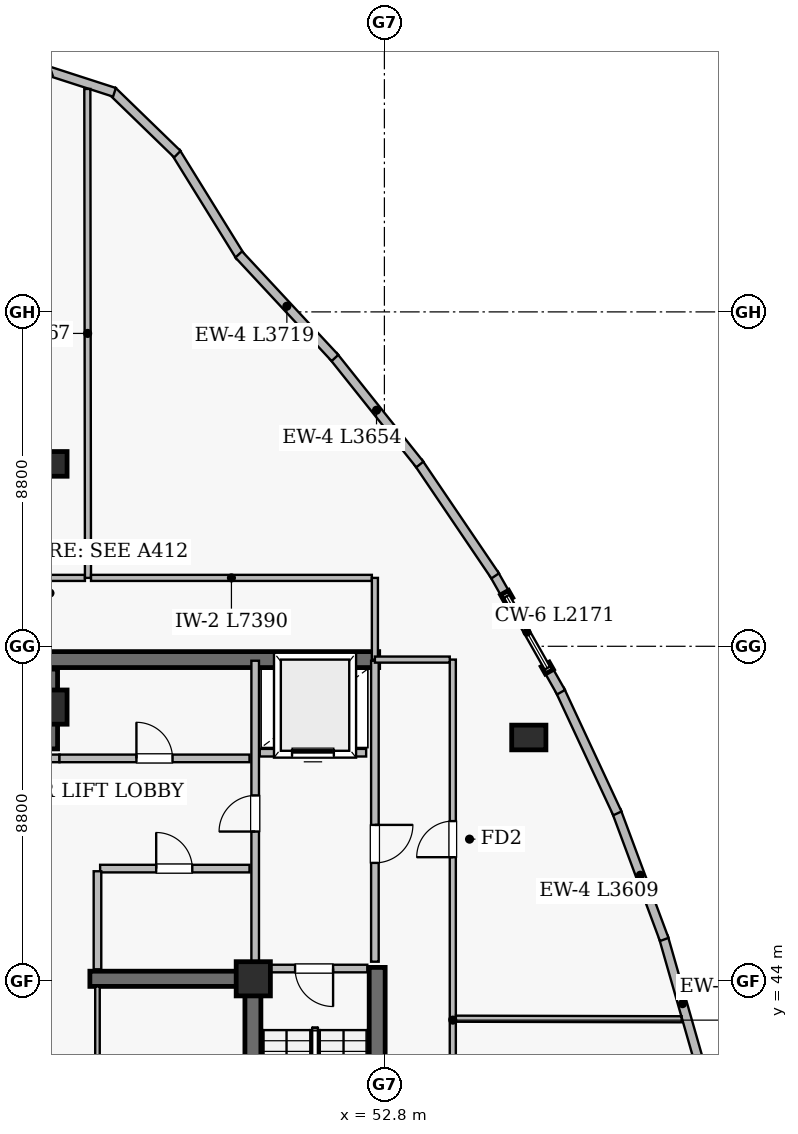
"""IFC4 building model, lengths in metres.
Left out: names, types, materials, properties, quantities, classifications, styles, units other than length and angle.
Written with IfcOpenShell. Run it as: python <this file> out.ifc"""

import sys

from ifc_helpers import new_model, si_unit, direction, frame, frame_2d, origin, origin_2d, place, context, subcontext, project, spatial, rectangle, extrude, element, fill, save


model = new_model("IFC4")
c1 = context("Model", 3, precision=1e-05, world=origin(), true_north=direction((0.0, 1.0)))
c2 = subcontext(c1, "Body", "Model", "MODEL_VIEW")
j1 = project(units=[si_unit("LENGTHUNIT", "METRE"), si_unit("PLANEANGLEUNIT", "RADIAN")], contexts=[c1])
p1 = place(None, origin())
s1 = spatial("IfcSite", under=j1, at=p1, CompositionType="ELEMENT")
p2 = place(p1, origin())
s2 = spatial("IfcBuilding", under=s1, at=p2, CompositionType="ELEMENT")
p3 = place(p2, frame((0.0, 0.0, 306.8)))
s3 = spatial("IfcBuildingStorey", under=s2, at=p3, CompositionType="ELEMENT", Elevation=306.8)
p4 = place(p3, frame((35.35, 52.45, 0.0), z_axis=(0.0, 0.0, 1.0), x_axis=(1.0, 0.0, 0.0)))
e1 = element("IfcWall", 1, at=p4, inside=s3, PredefinedType="SHEAR", context=c2, shape_type="SweptSolid", body=[
    extrude(rectangle(XDim=17.3, YDim=0.42, at=frame_2d((8.65, 0.0))), origin(), (0.0, 0.0, 1.0), 5.74),
])
p5 = place(p3, frame((52.61, 35.18, 0.0), z_axis=(0.0, 0.0, 1.0), x_axis=(0.0, 1.0, 0.0)))
e2 = element("IfcWall", 2, at=p5, inside=s3, PredefinedType="SHEAR", context=c2, shape_type="SweptSolid", body=[
    extrude(rectangle(XDim=9.17, YDim=0.42, at=frame_2d((4.585, 0.0))), origin(), (0.0, 0.0, 1.0), 5.74),
])
p6 = place(p3, frame((49.34, 35.4, 0.0), z_axis=(0.0, 0.0, 1.0), x_axis=(0.0, 1.0, 0.0)))
e3 = element("IfcWall", 3, at=p6, inside=s3, PredefinedType="SHEAR", context=c2, shape_type="SweptSolid", body=[
    extrude(rectangle(XDim=8.95, YDim=0.42, at=frame_2d((4.475, 0.0))), origin(), (0.0, 0.0, 1.0), 5.74),
])
p7 = place(p3, frame((44.0, 50.1, 0.0), z_axis=(0.0, 0.0, 1.0), x_axis=(0.0, 1.0, 0.0)))
e4 = element("IfcWall", 4, at=p7, inside=s3, PredefinedType="SHEAR", context=c2, shape_type="SweptSolid", body=[
    extrude(rectangle(XDim=2.1, YDim=0.4, at=frame_2d((1.05, 0.0))), origin(), (0.0, 0.0, 1.0), 5.74),
])
p8 = place(p3, frame((45.05, 44.05, 0.0), z_axis=(0.0, 0.0, 1.0), x_axis=(1.0, 0.0, 0.0)))
e5 = element("IfcWall", 5, at=p8, inside=s3, PredefinedType="SHEAR", context=c2, shape_type="SweptSolid", body=[
    extrude(rectangle(XDim=4.2, YDim=0.4, at=frame_2d((2.1, 0.0))), origin(), (0.0, 0.0, 1.0), 5.74),
])
for number, where, z_axis, x_axis in (
    (6, (49.35, 44.05, 0.0), (0.0, 0.0, 1.0), (1.0, 0.0, 0.0)),
    (7, (44.0, 51.2, 0.0), (0.0, 0.0, 1.0), (1.0, 0.0, 0.0)),
):
    element("IfcColumn", number, at=place(p3, frame(where, z_axis=z_axis, x_axis=x_axis)), inside=s3, PredefinedType="COLUMN", context=c2, shape_type="SweptSolid", body=[
        extrude(rectangle(XDim=0.9, YDim=0.9, at=origin_2d()), origin(), (0.0, 0.0, 1.0), 6.0),
    ])
for number, where, z_axis, x_axis in (
    (8, (44.0, 57.6, 0.0), (0.0, 0.0, 1.0), (1.0, 0.0, 0.0)),
    (9, (56.6, 50.4, 0.0), (0.0, 0.0, 1.0), (1.0, 0.0, 0.0)),
):
    element("IfcColumn", number, at=place(p3, frame(where, z_axis=z_axis, x_axis=x_axis)), inside=s3, PredefinedType="COLUMN", context=c2, shape_type="SweptSolid", body=[
        extrude(rectangle(XDim=0.9, YDim=0.65, at=origin_2d()), origin(), (0.0, 0.0, 1.0), 6.0),
    ])
p9 = place(p3, frame((49.01, 63.056, 0.0), z_axis=(0.0, 0.0, 1.0), x_axis=(-0.526110187608, 0.850416410058, 0.0)))
e10 = element("IfcWall", 10, at=p9, inside=s3, PredefinedType="SOLIDWALL", context=c2, shape_type="SweptSolid", body=[
    extrude(rectangle(XDim=3.233, YDim=0.24, at=frame_2d((1.616, 0.0))), origin(), (0.0, 0.0, 1.0), 5.74),
])
p10 = place(p3, frame((47.352, 65.751, 0.0), z_axis=(0.0, 0.0, 1.0), x_axis=(-0.717711443968, 0.69634063733, 0.0)))
e11 = element("IfcWall", 11, at=p10, inside=s3, PredefinedType="SOLIDWALL", context=c2, shape_type="SweptSolid", body=[
    extrude(rectangle(XDim=2.388, YDim=0.24, at=frame_2d((1.194, 0.0))), origin(), (0.0, 0.0, 1.0), 5.74),
])
for number, where, z_axis, x_axis in (
    (12, (45.697, 67.378, 0.0), (0.0, 0.0, 1.0), (-0.952, 0.308, 0.0)),
    (13, (44.033, 67.938, 0.0), (0.0, 0.0, 1.0), (-0.952, -0.308, 0.0)),
):
    element("IfcWall", number, at=place(p3, frame(where, z_axis=z_axis, x_axis=x_axis)), inside=s3, PredefinedType="SOLIDWALL", context=c2, shape_type="SweptSolid", body=[
        extrude(rectangle(XDim=1.818, YDim=0.24, at=frame_2d((0.909, 0.0))), origin(), (0.0, 0.0, 1.0), 5.74),
    ])
p11 = place(p3, frame((61.146, 41.639, 0.0), z_axis=(0.0, 0.0, 1.0), x_axis=(-0.274897629025, 0.961473501224, 0.0)))
e14 = element("IfcWall", 14, at=p11, inside=s3, PredefinedType="SOLIDWALL", context=c2, shape_type="SweptSolid", body=[
    extrude(rectangle(XDim=3.654, YDim=0.24, at=frame_2d((1.827, 0.0))), origin(), (0.0, 0.0, 1.0), 5.74),
])
p12 = place(p3, frame((60.163, 45.085, 0.0), z_axis=(0.0, 0.0, 1.0), x_axis=(-0.349054279873, 0.937102507574, 0.0)))
e15 = element("IfcWall", 15, at=p12, inside=s3, PredefinedType="SOLIDWALL", context=c2, shape_type="SweptSolid", body=[
    extrude(rectangle(XDim=3.609, YDim=0.24, at=frame_2d((1.805, 0.0))), origin(), (0.0, 0.0, 1.0), 5.74),
])
p13 = place(p3, frame((58.931, 48.403, 0.0), z_axis=(0.0, 0.0, 1.0), x_axis=(-0.422322757118, 0.906445524464, 0.0)))
e16 = element("IfcWall", 16, at=p13, inside=s3, PredefinedType="SOLIDWALL", context=c2, shape_type="SweptSolid", body=[
    extrude(rectangle(XDim=3.587, YDim=0.24, at=frame_2d((1.793, 0.0))), origin(), (0.0, 0.0, 1.0), 5.74),
])
p14 = place(p3, frame((57.448, 51.592, 0.0), z_axis=(0.0, 0.0, 1.0), x_axis=(-0.493406174407, 0.86979902682, 0.0)))
e17 = element("IfcWall", 17, at=p14, inside=s3, PredefinedType="SOLIDWALL", context=c2, shape_type="SweptSolid", body=[
    extrude(rectangle(XDim=0.751, YDim=0.24, at=frame_2d((0.375, 0.0))), origin(), (0.0, 0.0, 1.0), 5.74),
])
p15 = place(p3, frame((56.026, 54.099, 0.0), z_axis=(0.0, 0.0, 1.0), x_axis=(-0.493300984784, 0.86985868876, 0.0)))
e18 = element("IfcWall", 18, at=p15, inside=s3, PredefinedType="SOLIDWALL", context=c2, shape_type="SweptSolid", body=[
    extrude(rectangle(XDim=0.705, YDim=0.24, at=frame_2d((0.353, 0.0))), origin(), (0.0, 0.0, 1.0), 5.74),
])
p16 = place(p3, frame((55.715, 54.653, 0.0), z_axis=(0.0, 0.0, 1.0), x_axis=(-0.560819727484, 0.827937940467, 0.0)))
e19 = element("IfcWall", 19, at=p16, inside=s3, PredefinedType="SOLIDWALL", context=c2, shape_type="SweptSolid", body=[
    extrude(rectangle(XDim=3.609, YDim=0.24, at=frame_2d((1.805, 0.0))), origin(), (0.0, 0.0, 1.0), 5.74),
])
p17 = place(p3, frame((53.732, 57.584, 0.0), z_axis=(0.0, 0.0, 1.0), x_axis=(-0.623626980574, 0.781722066402, 0.0)))
e20 = element("IfcWall", 20, at=p17, inside=s3, PredefinedType="SOLIDWALL", context=c2, shape_type="SweptSolid", body=[
    extrude(rectangle(XDim=3.654, YDim=0.24, at=frame_2d((1.827, 0.0))), origin(), (0.0, 0.0, 1.0), 5.74),
])
p18 = place(p3, frame((51.5, 60.388, 0.0), z_axis=(0.0, 0.0, 1.0), x_axis=(-0.68087147599, 0.732402917241, 0.0)))
e21 = element("IfcWall", 21, at=p18, inside=s3, PredefinedType="SOLIDWALL", context=c2, shape_type="SweptSolid", body=[
    extrude(rectangle(XDim=3.719, YDim=0.24, at=frame_2d((1.859, 0.0))), origin(), (0.0, 0.0, 1.0), 5.74),
])
p19 = place(p3, frame((44.92, 54.6, 0.0), z_axis=(0.0, 0.0, 1.0), x_axis=(-1.0, 0.0, 0.0)))
e22 = element("IfcWall", 22, at=p19, inside=s3, PredefinedType="SOLIDWALL", context=c2, shape_type="SweptSolid", body=[
    extrude(rectangle(XDim=12.507, YDim=0.16, at=frame_2d((6.253, 0.0))), origin(), (0.0, 0.0, 1.0), 4.828),
])
p20 = place(p19, frame((5.779, 0.0, 0.0)))
e23 = element("IfcOpeningElement", 23, at=p20, cuts=e22, PredefinedType="OPENING", context=c2, shape_type="SweptSolid", body=[
    extrude(rectangle(XDim=0.95, YDim=2.15, at=frame_2d((0.475, 1.075))), frame((0.0, 0.09, 0.0), z_axis=(0.0, -1.0, 0.0), x_axis=(1.0, 0.0, 0.0)), (0.0, 0.0, 1.0), 0.18),
])
p21 = place(p3, frame((54.6, 33.4, 0.0), z_axis=(0.0, 0.0, 1.0), x_axis=(0.0, 1.0, 0.0)))
e24 = element("IfcWall", 24, at=p21, inside=s3, PredefinedType="SOLIDWALL", context=c2, shape_type="SweptSolid", body=[
    extrude(rectangle(XDim=9.6, YDim=0.16, at=frame_2d((4.8, 0.0))), origin(), (0.0, 0.0, 1.0), 4.828),
])
p22 = place(p21, frame((4.325, 0.0, 0.0)))
e25 = element("IfcOpeningElement", 25, at=p22, cuts=e24, PredefinedType="OPENING", context=c2, shape_type="SweptSolid", body=[
    extrude(rectangle(XDim=0.95, YDim=2.15, at=frame_2d((0.475, 1.075))), frame((0.0, 0.09, 0.0), z_axis=(0.0, -1.0, 0.0), x_axis=(1.0, 0.0, 0.0)), (0.0, 0.0, 1.0), 0.18),
])
p23 = place(p3, frame((54.6, 43.0, 0.0), z_axis=(0.0, 0.0, 1.0), x_axis=(0.0, 1.0, 0.0)))
e26 = element("IfcWall", 26, at=p23, inside=s3, PredefinedType="SOLIDWALL", context=c2, shape_type="SweptSolid", body=[
    extrude(rectangle(XDim=9.45, YDim=0.16, at=frame_2d((4.725, 0.0))), origin(), (0.0, 0.0, 1.0), 4.828),
])
p24 = place(p23, frame((4.25, 0.0, 0.0)))
e27 = element("IfcOpeningElement", 27, at=p24, cuts=e26, PredefinedType="OPENING", context=c2, shape_type="SweptSolid", body=[
    extrude(rectangle(XDim=0.95, YDim=2.15, at=frame_2d((0.475, 1.075))), frame((0.0, 0.09, 0.0), z_axis=(0.0, -1.0, 0.0), x_axis=(1.0, 0.0, 0.0)), (0.0, 0.0, 1.0), 0.18),
])
p25 = place(p3, frame((45.25, 35.6, 0.0), z_axis=(0.0, 0.0, 1.0), x_axis=(0.0, 1.0, 0.0)))
e28 = element("IfcWall", 28, at=p25, inside=s3, PredefinedType="PARTITIONING", context=c2, shape_type="SweptSolid", body=[
    extrude(rectangle(XDim=8.25, YDim=0.12, at=frame_2d((4.125, 0.0))), origin(), (0.0, 0.0, 1.0), 5.74),
])
p26 = place(p25, frame((3.625, 0.0, 0.0)))
e29 = element("IfcOpeningElement", 29, at=p26, cuts=e28, PredefinedType="OPENING", context=c2, shape_type="SweptSolid", body=[
    extrude(rectangle(XDim=0.95, YDim=2.1, at=frame_2d((0.475, 1.05))), frame((0.0, 0.07, 0.0), z_axis=(0.0, -1.0, 0.0), x_axis=(1.0, 0.0, 0.0)), (0.0, 0.0, 1.0), 0.14),
])
p27 = place(p3, frame((52.55, 44.5, 0.0), z_axis=(0.0, 0.0, 1.0), x_axis=(0.0, 1.0, 0.0)))
e30 = element("IfcWall", 30, at=p27, inside=s3, PredefinedType="SOLIDWALL", context=c2, shape_type="SweptSolid", body=[
    extrude(rectangle(XDim=7.92, YDim=0.2, at=frame_2d((3.96, 0.0))), origin(), (0.0, 0.0, 1.0), 5.74),
])
p28 = place(p27, frame((2.6, 0.0, 0.0)))
e31 = element("IfcOpeningElement", 31, at=p28, cuts=e30, PredefinedType="OPENING", context=c2, shape_type="SweptSolid", body=[
    extrude(rectangle(XDim=1.0, YDim=2.15, at=frame_2d((0.5, 1.075))), frame((0.0, 0.11, 0.0), z_axis=(0.0, -1.0, 0.0), x_axis=(1.0, 0.0, 0.0)), (0.0, 0.0, 1.0), 0.22),
])
p29 = place(p3, frame((49.4, 44.5, 0.0), z_axis=(0.0, 0.0, 1.0), x_axis=(0.0, 1.0, 0.0)))
e32 = element("IfcWall", 32, at=p29, inside=s3, PredefinedType="SOLIDWALL", context=c2, shape_type="SweptSolid", body=[
    extrude(rectangle(XDim=7.92, YDim=0.2, at=frame_2d((3.96, 0.0))), origin(), (0.0, 0.0, 1.0), 4.828),
])
p30 = place(p29, frame((3.425, 0.0, 0.0)))
e33 = element("IfcOpeningElement", 33, at=p30, cuts=e32, PredefinedType="OPENING", context=c2, shape_type="SweptSolid", body=[
    extrude(rectangle(XDim=0.95, YDim=2.15, at=frame_2d((0.475, 1.075))), frame((0.0, 0.11, 0.0), z_axis=(0.0, -1.0, 0.0), x_axis=(1.0, 0.0, 0.0)), (0.0, 0.0, 1.0), 0.22),
])
p31 = place(p3, frame((38.75, 49.85, 0.0), z_axis=(0.0, 0.0, 1.0), x_axis=(1.0, 0.0, 0.0)))
e34 = element("IfcWall", 34, at=p31, inside=s3, PredefinedType="SOLIDWALL", context=c2, shape_type="SweptSolid", body=[
    extrude(rectangle(XDim=5.5, YDim=0.2, at=frame_2d((2.75, 0.0))), origin(), (0.0, 0.0, 1.0), 5.74),
])
p32 = place(p31, frame((2.025, 0.0, 0.0)))
e35 = element("IfcOpeningElement", 35, at=p32, cuts=e34, PredefinedType="OPENING", context=c2, shape_type="SweptSolid", body=[
    extrude(rectangle(XDim=0.95, YDim=2.15, at=frame_2d((0.475, 1.075))), frame((0.0, 0.11, 0.0), z_axis=(0.0, -1.0, 0.0), x_axis=(1.0, 0.0, 0.0)), (0.0, 0.0, 1.0), 0.22),
])
p33 = place(p3, frame((44.25, 49.85, 0.0), z_axis=(0.0, 0.0, 1.0), x_axis=(1.0, 0.0, 0.0)))
e36 = element("IfcWall", 36, at=p33, inside=s3, PredefinedType="SOLIDWALL", context=c2, shape_type="SweptSolid", body=[
    extrude(rectangle(XDim=5.0, YDim=0.2, at=frame_2d((2.5, 0.0))), origin(), (0.0, 0.0, 1.0), 4.828),
])
p34 = place(p33, frame((2.025, 0.0, 0.0)))
e37 = element("IfcOpeningElement", 37, at=p34, cuts=e36, PredefinedType="OPENING", context=c2, shape_type="SweptSolid", body=[
    extrude(rectangle(XDim=0.95, YDim=2.15, at=frame_2d((0.475, 1.075))), frame((0.0, 0.11, 0.0), z_axis=(0.0, -1.0, 0.0), x_axis=(1.0, 0.0, 0.0)), (0.0, 0.0, 1.0), 0.22),
])
p35 = place(p3, frame((45.32, 46.95, 0.0), z_axis=(0.0, 0.0, 1.0), x_axis=(1.0, 0.0, 0.0)))
e38 = element("IfcWall", 38, at=p35, inside=s3, PredefinedType="SOLIDWALL", context=c2, shape_type="SweptSolid", body=[
    extrude(rectangle(XDim=3.93, YDim=0.2, at=frame_2d((1.965, 0.0))), origin(), (0.0, 0.0, 1.0), 4.828),
])
p36 = place(p35, frame((1.475, 0.0, 0.0)))
e39 = element("IfcOpeningElement", 39, at=p36, cuts=e38, PredefinedType="OPENING", context=c2, shape_type="SweptSolid", body=[
    extrude(rectangle(XDim=0.95, YDim=2.1, at=frame_2d((0.475, 1.05))), frame((0.0, 0.11, 0.0), z_axis=(0.0, -1.0, 0.0), x_axis=(1.0, 0.0, 0.0)), (0.0, 0.0, 1.0), 0.22),
])
p37 = place(p3, frame((49.55, 44.32, 0.0), z_axis=(0.0, 0.0, 1.0), x_axis=(1.0, 0.0, 0.0)))
e40 = element("IfcWall", 40, at=p37, inside=s3, PredefinedType="SOLIDWALL", context=c2, shape_type="SweptSolid", body=[
    extrude(rectangle(XDim=2.8, YDim=0.2, at=frame_2d((1.4, 0.0))), origin(), (0.0, 0.0, 1.0), 4.828),
])
p38 = place(p37, frame((0.9, 0.0, 0.0)))
e41 = element("IfcOpeningElement", 41, at=p38, cuts=e40, PredefinedType="OPENING", context=c2, shape_type="SweptSolid", body=[
    extrude(rectangle(XDim=1.0, YDim=2.15, at=frame_2d((0.5, 1.075))), frame((0.0, 0.11, 0.0), z_axis=(0.0, -1.0, 0.0), x_axis=(1.0, 0.0, 0.0)), (0.0, 0.0, 1.0), 0.22),
])
p39 = place(p3, frame((49.52, 50.0, 0.0), z_axis=(0.0, 0.0, 1.0), x_axis=(1.0, 0.0, 0.0)))
e42 = element("IfcWall", 42, at=p39, inside=s3, PredefinedType="SOLIDWALL", context=c2, shape_type="SweptSolid", body=[
    extrude(rectangle(XDim=2.8, YDim=0.2, at=frame_2d((1.4, 0.0))), origin(), (0.0, 0.0, 1.0), 5.74),
])
p40 = place(p39, frame((0.85, 0.0, 0.0)))
e43 = element("IfcOpeningElement", 43, at=p40, cuts=e42, PredefinedType="OPENING", context=c2, shape_type="SweptSolid", body=[
    extrude(rectangle(XDim=1.1, YDim=2.15, at=frame_2d((0.55, 1.075))), frame((0.0, 0.11, 0.0), z_axis=(0.0, -1.0, 0.0), x_axis=(1.0, 0.0, 0.0)), (0.0, 0.0, 1.0), 0.22),
])
p41 = place(p3, frame((45.0, 54.6, 0.0), z_axis=(0.0, 0.0, 1.0), x_axis=(-0.001328196464, 0.999999117947, 0.0)))
e44 = element("IfcWall", 44, at=p41, inside=s3, PredefinedType="SOLIDWALL", context=c2, shape_type="SweptSolid", body=[
    extrude(rectangle(XDim=12.867, YDim=0.16, at=frame_2d((6.434, 0.0))), origin(), (0.0, 0.0, 1.0), 4.828),
])
p42 = place(p3, frame((52.47, 54.6, 0.0), z_axis=(0.0, 0.0, 1.0), x_axis=(-1.0, 0.0, 0.0)))
e45 = element("IfcWall", 45, at=p42, inside=s3, PredefinedType="SOLIDWALL", context=c2, shape_type="SweptSolid", body=[
    extrude(rectangle(XDim=7.39, YDim=0.16, at=frame_2d((3.695, 0.0))), origin(), (0.0, 0.0, 1.0), 4.828),
])
p43 = place(p3, frame((60.621, 42.985, 0.0), z_axis=(0.0, 0.0, 1.0), x_axis=(-0.999996858298, 0.00250666975, 0.0)))
e46 = element("IfcWall", 46, at=p43, inside=s3, PredefinedType="SOLIDWALL", context=c2, shape_type="SweptSolid", body=[
    extrude(rectangle(XDim=5.941, YDim=0.16, at=frame_2d((2.971, 0.0))), origin(), (0.0, 0.0, 1.0), 4.828),
])
p44 = place(p3, frame((45.25, 44.3, 0.0), z_axis=(0.0, 0.0, 1.0), x_axis=(0.0, 1.0, 0.0)))
e47 = element("IfcWall", 47, at=p44, inside=s3, PredefinedType="SOLIDWALL", context=c2, shape_type="SweptSolid", body=[
    extrude(rectangle(XDim=2.58, YDim=0.2, at=frame_2d((1.29, 0.0))), origin(), (0.0, 0.0, 1.0), 5.74),
])
p45 = place(p3, frame((52.55, 52.45, 0.0), z_axis=(0.0, 0.0, 1.0), x_axis=(0.0, 1.0, 0.0)))
e48 = element("IfcWall", 48, at=p45, inside=s3, PredefinedType="SOLIDWALL", context=c2, shape_type="SweptSolid", body=[
    extrude(rectangle(XDim=2.15, YDim=0.16, at=frame_2d((1.075, 0.0))), origin(), (0.0, 0.0, 1.0), 4.828),
])
p46 = place(p3, frame((54.52, 52.45, 0.0), z_axis=(0.0, 0.0, 1.0), x_axis=(-1.0, 0.0, 0.0)))
e49 = element("IfcWall", 49, at=p46, inside=s3, PredefinedType="SOLIDWALL", context=c2, shape_type="SweptSolid", body=[
    extrude(rectangle(XDim=1.97, YDim=0.16, at=frame_2d((0.985, 0.0))), origin(), (0.0, 0.0, 1.0), 4.828),
])
p47 = place(p38, frame((1.0, 0.0, 0.0), z_axis=(0.0, 0.0, 1.0), x_axis=(-1.0, 0.0, 0.0)))
e50 = element("IfcDoor", 50, at=p47, inside=s3, OperationType="SINGLE_SWING_RIGHT", PredefinedType="DOOR", context=c2, shape_type="SweptSolid", body=[
    extrude(rectangle(XDim=1.0, YDim=2.15, at=frame_2d((0.5, 1.075))), frame((0.0, 0.025, 0.0), z_axis=(0.0, -1.0, 0.0), x_axis=(1.0, 0.0, 0.0)), (0.0, 0.0, 1.0), 0.05),
])
fill(e41, e50)
p48 = place(p28, frame((1.0, 0.0, 0.0), z_axis=(0.0, 0.0, 1.0), x_axis=(-1.0, 0.0, 0.0)))
e51 = element("IfcDoor", 51, at=p48, inside=s3, OperationType="SINGLE_SWING_RIGHT", PredefinedType="DOOR", context=c2, shape_type="SweptSolid", body=[
    extrude(rectangle(XDim=1.0, YDim=2.15, at=frame_2d((0.5, 1.075))), frame((0.0, 0.025, 0.0), z_axis=(0.0, -1.0, 0.0), x_axis=(1.0, 0.0, 0.0)), (0.0, 0.0, 1.0), 0.05),
])
fill(e31, e51)
p49 = place(p30, origin())
e52 = element("IfcDoor", 52, at=p49, inside=s3, OperationType="SINGLE_SWING_LEFT", PredefinedType="DOOR", context=c2, shape_type="SweptSolid", body=[
    extrude(rectangle(XDim=0.95, YDim=2.15, at=frame_2d((0.475, 1.075))), frame((0.0, 0.025, 0.0), z_axis=(0.0, -1.0, 0.0), x_axis=(1.0, 0.0, 0.0)), (0.0, 0.0, 1.0), 0.05),
])
fill(e33, e52)
p50 = place(p40, origin())
e53 = element("IfcDoor", 53, at=p50, inside=s3, OperationType="SLIDING_TO_LEFT", PredefinedType="DOOR", context=c2, shape_type="SweptSolid", body=[
    extrude(rectangle(XDim=1.1, YDim=2.15, at=frame_2d((0.55, 1.075))), frame((0.0, 0.025, 0.0), z_axis=(0.0, -1.0, 0.0), x_axis=(1.0, 0.0, 0.0)), (0.0, 0.0, 1.0), 0.05),
])
fill(e43, e53)
p51 = place(p34, origin())
e54 = element("IfcDoor", 54, at=p51, inside=s3, OperationType="SINGLE_SWING_LEFT", PredefinedType="DOOR", context=c2, shape_type="SweptSolid", body=[
    extrude(rectangle(XDim=0.95, YDim=2.15, at=frame_2d((0.475, 1.075))), frame((0.0, 0.025, 0.0), z_axis=(0.0, -1.0, 0.0), x_axis=(1.0, 0.0, 0.0)), (0.0, 0.0, 1.0), 0.05),
])
fill(e37, e54)
p52 = place(p36, origin())
e55 = element("IfcDoor", 55, at=p52, inside=s3, OperationType="SINGLE_SWING_LEFT", PredefinedType="DOOR", context=c2, shape_type="SweptSolid", body=[
    extrude(rectangle(XDim=0.95, YDim=2.1, at=frame_2d((0.475, 1.05))), frame((0.0, 0.025, 0.0), z_axis=(0.0, -1.0, 0.0), x_axis=(1.0, 0.0, 0.0)), (0.0, 0.0, 1.0), 0.05),
])
fill(e39, e55)
p53 = place(p24, origin())
e56 = element("IfcDoor", 56, at=p53, inside=s3, OperationType="SINGLE_SWING_LEFT", PredefinedType="DOOR", context=c2, shape_type="SweptSolid", body=[
    extrude(rectangle(XDim=0.95, YDim=2.15, at=frame_2d((0.475, 1.075))), frame((0.0, 0.025, 0.0), z_axis=(0.0, -1.0, 0.0), x_axis=(1.0, 0.0, 0.0)), (0.0, 0.0, 1.0), 0.05),
])
fill(e27, e56)
save(model, sys.argv[1])
